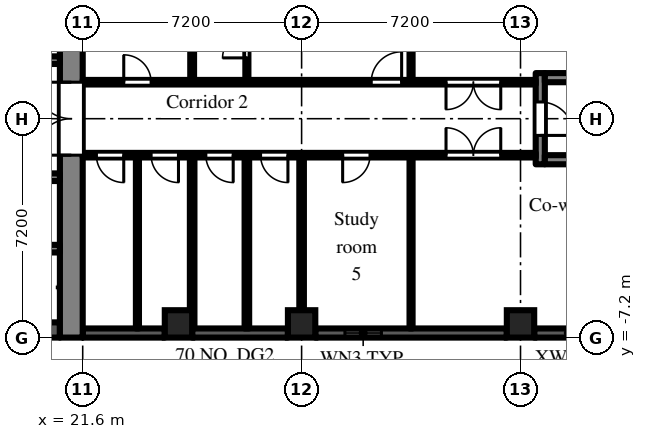
"""IFC4 building model, lengths in metres.
Left out: names, types, materials, properties, quantities, classifications, styles, units other than length and angle.
Written with IfcOpenShell. Run it as: python <this file> out.ifc"""

import sys

from ifc_helpers import new_model, si_unit, direction, frame, frame_2d, origin, origin_2d, place, context, subcontext, project, spatial, rectangle, extrude, element, fill, save


model = new_model("IFC4")
c1 = context("Model", 3, precision=1e-05, world=origin(), true_north=direction((0.0, 1.0)))
c2 = subcontext(c1, "Body", "Model", "MODEL_VIEW")
j1 = project(units=[si_unit("LENGTHUNIT", "METRE"), si_unit("PLANEANGLEUNIT", "RADIAN")], contexts=[c1])
p1 = place(None, origin())
s1 = spatial("IfcSite", under=j1, at=p1, CompositionType="ELEMENT")
p2 = place(p1, origin())
s2 = spatial("IfcBuilding", under=s1, at=p2, CompositionType="ELEMENT")
p3 = place(p2, frame((0.0, 0.0, 44.7)))
s3 = spatial("IfcBuildingStorey", under=s2, at=p3, CompositionType="ELEMENT", Elevation=44.7)
for number, where, z_axis, x_axis in (
    (1, (24.75, -6.75, 0.0), (0.0, 0.0, 1.0), (1.0, 0.0, 0.0)),
    (2, (28.8, -6.75, 0.0), (0.0, 0.0, 1.0), (1.0, 0.0, 0.0)),
    (3, (36.0, -6.75, 0.0), (0.0, 0.0, 1.0), (1.0, 0.0, 0.0)),
):
    element("IfcColumn", number, at=place(p3, frame(where, z_axis=z_axis, x_axis=x_axis)), inside=s3, PredefinedType="COLUMN", context=c2, shape_type="SweptSolid", body=[
        extrude(rectangle(XDim=0.9, YDim=0.9, at=origin_2d()), origin(), (0.0, 0.0, 1.0), 3.0),
    ])
p4 = place(p3, frame((21.6, -7.05, 0.0), z_axis=(0.0, 0.0, 1.0), x_axis=(1.0, 0.0, 0.0)))
e4 = element("IfcWall", 4, at=p4, inside=s3, PredefinedType="SOLIDWALL", context=c2, shape_type="SweptSolid", body=[
    extrude(rectangle(XDim=2.7, YDim=0.3, at=frame_2d((1.35, 0.0))), origin(), (0.0, 0.0, 1.0), 2.1),
])
p5 = place(p3, frame((25.2, -7.05, 0.0), z_axis=(0.0, 0.0, 1.0), x_axis=(1.0, 0.0, 0.0)))
e5 = element("IfcWall", 5, at=p5, inside=s3, PredefinedType="SOLIDWALL", context=c2, shape_type="SweptSolid", body=[
    extrude(rectangle(XDim=3.15, YDim=0.3, at=frame_2d((1.575, 0.0))), origin(), (0.0, 0.0, 1.0), 2.1),
])
p6 = place(p3, frame((29.25, -7.05, 0.0), z_axis=(0.0, 0.0, 1.0), x_axis=(1.0, 0.0, 0.0)))
e6 = element("IfcWall", 6, at=p6, inside=s3, PredefinedType="SOLIDWALL", context=c2, shape_type="SweptSolid", body=[
    extrude(rectangle(XDim=6.3, YDim=0.3, at=frame_2d((3.15, 0.0))), origin(), (0.0, 0.0, 1.0), 2.1),
])
p7 = place(p6, frame((0.975, 0.0, 0.2)))
e7 = element("IfcOpeningElement", 7, at=p7, cuts=e6, PredefinedType="OPENING", context=c2, shape_type="SweptSolid", body=[
    extrude(rectangle(XDim=1.2, YDim=1.85, at=frame_2d((0.6, 0.925))), frame((0.0, 0.16, 0.0), z_axis=(0.0, -1.0, 0.0), x_axis=(1.0, 0.0, 0.0)), (0.0, 0.0, 1.0), 0.32),
])
p8 = place(p3, frame((36.45, -7.05, 0.0), z_axis=(0.0, 0.0, 1.0), x_axis=(1.0, 0.0, 0.0)))
e8 = element("IfcWall", 8, at=p8, inside=s3, PredefinedType="SOLIDWALL", context=c2, shape_type="SweptSolid", body=[
    extrude(rectangle(XDim=2.25, YDim=0.3, at=frame_2d((1.125, 0.0))), origin(), (0.0, 0.0, 1.0), 2.1),
])
p9 = place(p3, frame((21.225, -7.2, 0.0), z_axis=(0.0, 0.0, 1.0), x_axis=(0.0, 1.0, 0.0)))
e9 = element("IfcWall", 9, at=p9, inside=s3, PredefinedType="SHEAR", context=c2, shape_type="SweptSolid", body=[
    extrude(rectangle(XDim=14.4, YDim=0.75, at=frame_2d((7.2, 0.0))), origin(), (0.0, 0.0, 1.0), 2.575),
])
p10 = place(p9, frame((6.0, 0.0, 0.0)))
e10 = element("IfcOpeningElement", 10, at=p10, cuts=e9, PredefinedType="OPENING", context=c2, shape_type="SweptSolid", body=[
    extrude(rectangle(XDim=2.4, YDim=2.2, at=frame_2d((1.2, 1.1))), frame((0.0, 0.385, 0.0), z_axis=(0.0, -1.0, 0.0), x_axis=(1.0, 0.0, 0.0)), (0.0, 0.0, 1.0), 0.77),
])
p11 = place(p3, frame((7.9, 1.925, 0.0), z_axis=(0.0, 0.0, 1.0), x_axis=(1.0, 0.0, 0.0)))
e11 = element("IfcWall", 11, at=p11, inside=s3, PredefinedType="SHEAR", context=c2, shape_type="SweptSolid", body=[
    extrude(rectangle(XDim=12.95, YDim=0.25, at=frame_2d((6.475, 0.0))), origin(), (0.0, 0.0, 1.0), 2.575),
])
p12 = place(p11, frame((0.525, 0.0, 0.0)))
e12 = element("IfcOpeningElement", 12, at=p12, cuts=e11, PredefinedType="OPENING", context=c2, shape_type="SweptSolid", body=[
    extrude(rectangle(XDim=0.9, YDim=2.1, at=frame_2d((0.45, 1.05))), frame((0.0, 0.135, 0.0), z_axis=(0.0, -1.0, 0.0), x_axis=(1.0, 0.0, 0.0)), (0.0, 0.0, 1.0), 0.27),
])
p13 = place(p11, frame((2.625, 0.0, 0.0)))
e13 = element("IfcOpeningElement", 13, at=p13, cuts=e11, PredefinedType="OPENING", context=c2, shape_type="SweptSolid", body=[
    extrude(rectangle(XDim=1.1, YDim=2.1, at=frame_2d((0.55, 1.05))), frame((0.0, 0.135, 0.0), z_axis=(0.0, -1.0, 0.0), x_axis=(1.0, 0.0, 0.0)), (0.0, 0.0, 1.0), 0.27),
])
p14 = place(p11, frame((4.925, 0.0, 0.0)))
e14 = element("IfcOpeningElement", 14, at=p14, cuts=e11, PredefinedType="OPENING", context=c2, shape_type="SweptSolid", body=[
    extrude(rectangle(XDim=0.9, YDim=2.1, at=frame_2d((0.45, 1.05))), frame((0.0, 0.135, 0.0), z_axis=(0.0, -1.0, 0.0), x_axis=(1.0, 0.0, 0.0)), (0.0, 0.0, 1.0), 0.27),
])
p15 = place(p11, frame((8.225, 0.0, 0.0)))
e15 = element("IfcOpeningElement", 15, at=p15, cuts=e11, PredefinedType="OPENING", context=c2, shape_type="SweptSolid", body=[
    extrude(rectangle(XDim=0.9, YDim=2.1, at=frame_2d((0.45, 1.05))), frame((0.0, 0.135, 0.0), z_axis=(0.0, -1.0, 0.0), x_axis=(1.0, 0.0, 0.0)), (0.0, 0.0, 1.0), 0.27),
])
p16 = place(p3, frame((7.9, -6.95, 0.0), z_axis=(0.0, 0.0, 1.0), x_axis=(1.0, 0.0, 0.0)))
e16 = element("IfcWall", 16, at=p16, inside=s3, PredefinedType="SHEAR", context=c2, shape_type="SweptSolid", body=[
    extrude(rectangle(XDim=12.95, YDim=0.5, at=frame_2d((6.475, 0.0))), origin(), (0.0, 0.0, 1.0), 2.575),
])
p17 = place(p3, frame((7.9, -1.925, 0.0), z_axis=(0.0, 0.0, 1.0), x_axis=(1.0, 0.0, 0.0)))
e17 = element("IfcWall", 17, at=p17, inside=s3, PredefinedType="SHEAR", context=c2, shape_type="SweptSolid", body=[
    extrude(rectangle(XDim=12.95, YDim=0.25, at=frame_2d((6.475, 0.0))), origin(), (0.0, 0.0, 1.0), 2.575),
])
p18 = place(p17, frame((4.825, 0.0, 0.0)))
e18 = element("IfcOpeningElement", 18, at=p18, cuts=e17, PredefinedType="OPENING", context=c2, shape_type="SweptSolid", body=[
    extrude(rectangle(XDim=1.1, YDim=2.1, at=frame_2d((0.55, 1.05))), frame((0.0, 0.135, 0.0), z_axis=(0.0, -1.0, 0.0), x_axis=(1.0, 0.0, 0.0)), (0.0, 0.0, 1.0), 0.27),
])
p19 = place(p17, frame((7.025, 0.0, 0.0)))
e19 = element("IfcOpeningElement", 19, at=p19, cuts=e17, PredefinedType="OPENING", context=c2, shape_type="SweptSolid", body=[
    extrude(rectangle(XDim=1.1, YDim=2.1, at=frame_2d((0.55, 1.05))), frame((0.0, 0.135, 0.0), z_axis=(0.0, -1.0, 0.0), x_axis=(1.0, 0.0, 0.0)), (0.0, 0.0, 1.0), 0.27),
])
p20 = place(p17, frame((9.225, 0.0, 0.0)))
e20 = element("IfcOpeningElement", 20, at=p20, cuts=e17, PredefinedType="OPENING", context=c2, shape_type="SweptSolid", body=[
    extrude(rectangle(XDim=1.1, YDim=2.1, at=frame_2d((0.55, 1.05))), frame((0.0, 0.135, 0.0), z_axis=(0.0, -1.0, 0.0), x_axis=(1.0, 0.0, 0.0)), (0.0, 0.0, 1.0), 0.27),
])
p21 = place(p17, frame((0.525, 0.0, 0.0)))
e21 = element("IfcOpeningElement", 21, at=p21, cuts=e17, PredefinedType="OPENING", context=c2, shape_type="SweptSolid", body=[
    extrude(rectangle(XDim=0.9, YDim=2.1, at=frame_2d((0.45, 1.05))), frame((0.0, 0.135, 0.0), z_axis=(0.0, -1.0, 0.0), x_axis=(1.0, 0.0, 0.0)), (0.0, 0.0, 1.0), 0.27),
])
p22 = place(p17, frame((2.625, 0.0, 0.0)))
e22 = element("IfcOpeningElement", 22, at=p22, cuts=e17, PredefinedType="OPENING", context=c2, shape_type="SweptSolid", body=[
    extrude(rectangle(XDim=1.1, YDim=2.1, at=frame_2d((0.55, 1.05))), frame((0.0, 0.135, 0.0), z_axis=(0.0, -1.0, 0.0), x_axis=(1.0, 0.0, 0.0)), (0.0, 0.0, 1.0), 0.27),
])
p23 = place(p3, frame((12.3, -4.275, 0.0), z_axis=(0.0, 0.0, 1.0), x_axis=(1.0, 0.0, 0.0)))
e23 = element("IfcWall", 23, at=p23, inside=s3, PredefinedType="SHEAR", context=c2, shape_type="SweptSolid", body=[
    extrude(rectangle(XDim=8.55, YDim=0.25, at=frame_2d((4.275, 0.0))), origin(), (0.0, 0.0, 1.0), 2.575),
])
p24 = place(p3, frame((36.65, -1.5, 0.0), z_axis=(0.0, 0.0, 1.0), x_axis=(0.0, 1.0, 0.0)))
e24 = element("IfcWall", 24, at=p24, inside=s3, PredefinedType="SHEAR", context=c2, shape_type="SweptSolid", body=[
    extrude(rectangle(XDim=3.0, YDim=0.3, at=frame_2d((1.5, 0.0))), origin(), (0.0, 0.0, 1.0), 2.575),
])
p25 = place(p24, frame((0.95, 0.0, 0.0)))
e25 = element("IfcOpeningElement", 25, at=p25, cuts=e24, PredefinedType="OPENING", context=c2, shape_type="SweptSolid", body=[
    extrude(rectangle(XDim=1.1, YDim=2.1, at=frame_2d((0.55, 1.05))), frame((0.0, 0.16, 0.0), z_axis=(0.0, -1.0, 0.0), x_axis=(1.0, 0.0, 0.0)), (0.0, 0.0, 1.0), 0.32),
])
for number, where, z_axis, x_axis in (
    (26, (36.8, -1.35, 0.0), (0.0, 0.0, 1.0), (1.0, 0.0, 0.0)),
    (27, (36.8, 1.35, 0.0), (0.0, 0.0, 1.0), (1.0, 0.0, 0.0)),
):
    element("IfcWall", number, at=place(p3, frame(where, z_axis=z_axis, x_axis=x_axis)), inside=s3, PredefinedType="SHEAR", context=c2, shape_type="SweptSolid", body=[
        extrude(rectangle(XDim=5.8, YDim=0.3, at=frame_2d((2.9, 0.0))), origin(), (0.0, 0.0, 1.0), 2.575),
    ])
p26 = place(p3, frame((21.6, -1.2, 0.0), z_axis=(0.0, 0.0, 1.0), x_axis=(1.0, 0.0, 0.0)))
e28 = element("IfcWall", 28, at=p26, inside=s3, PredefinedType="PARTITIONING", context=c2, shape_type="SweptSolid", body=[
    extrude(rectangle(XDim=14.9, YDim=0.15, at=frame_2d((7.45, 0.0))), origin(), (0.0, 0.0, 1.0), 2.575),
])
p27 = place(p26, frame((0.45, 0.0, 0.0)))
e29 = element("IfcOpeningElement", 29, at=p27, cuts=e28, PredefinedType="OPENING", context=c2, shape_type="SweptSolid", body=[
    extrude(rectangle(XDim=0.9, YDim=2.1, at=frame_2d((0.45, 1.05))), frame((0.0, 0.085, 0.0), z_axis=(0.0, -1.0, 0.0), x_axis=(1.0, 0.0, 0.0)), (0.0, 0.0, 1.0), 0.17),
])
p28 = place(p26, frame((2.25, 0.0, 0.0)))
e30 = element("IfcOpeningElement", 30, at=p28, cuts=e28, PredefinedType="OPENING", context=c2, shape_type="SweptSolid", body=[
    extrude(rectangle(XDim=0.9, YDim=2.1, at=frame_2d((0.45, 1.05))), frame((0.0, 0.085, 0.0), z_axis=(0.0, -1.0, 0.0), x_axis=(1.0, 0.0, 0.0)), (0.0, 0.0, 1.0), 0.17),
])
p29 = place(p26, frame((4.05, 0.0, 0.0)))
e31 = element("IfcOpeningElement", 31, at=p29, cuts=e28, PredefinedType="OPENING", context=c2, shape_type="SweptSolid", body=[
    extrude(rectangle(XDim=0.9, YDim=2.1, at=frame_2d((0.45, 1.05))), frame((0.0, 0.085, 0.0), z_axis=(0.0, -1.0, 0.0), x_axis=(1.0, 0.0, 0.0)), (0.0, 0.0, 1.0), 0.17),
])
p30 = place(p26, frame((5.85, 0.0, 0.0)))
e32 = element("IfcOpeningElement", 32, at=p30, cuts=e28, PredefinedType="OPENING", context=c2, shape_type="SweptSolid", body=[
    extrude(rectangle(XDim=0.9, YDim=2.1, at=frame_2d((0.45, 1.05))), frame((0.0, 0.085, 0.0), z_axis=(0.0, -1.0, 0.0), x_axis=(1.0, 0.0, 0.0)), (0.0, 0.0, 1.0), 0.17),
])
p31 = place(p26, frame((8.55, 0.0, 0.0)))
e33 = element("IfcOpeningElement", 33, at=p31, cuts=e28, PredefinedType="OPENING", context=c2, shape_type="SweptSolid", body=[
    extrude(rectangle(XDim=0.9, YDim=2.1, at=frame_2d((0.45, 1.05))), frame((0.0, 0.085, 0.0), z_axis=(0.0, -1.0, 0.0), x_axis=(1.0, 0.0, 0.0)), (0.0, 0.0, 1.0), 0.17),
])
p32 = place(p26, frame((11.95, 0.0, 0.0)))
e34 = element("IfcOpeningElement", 34, at=p32, cuts=e28, PredefinedType="OPENING", context=c2, shape_type="SweptSolid", body=[
    extrude(rectangle(XDim=1.8, YDim=2.1, at=frame_2d((0.9, 1.05))), frame((0.0, 0.085, 0.0), z_axis=(0.0, -1.0, 0.0), x_axis=(1.0, 0.0, 0.0)), (0.0, 0.0, 1.0), 0.17),
])
p33 = place(p3, frame((21.6, 1.2, 0.0), z_axis=(0.0, 0.0, 1.0), x_axis=(1.0, 0.0, 0.0)))
e35 = element("IfcWall", 35, at=p33, inside=s3, PredefinedType="PARTITIONING", context=c2, shape_type="SweptSolid", body=[
    extrude(rectangle(XDim=14.9, YDim=0.15, at=frame_2d((7.45, 0.0))), origin(), (0.0, 0.0, 1.0), 2.575),
])
p34 = place(p33, frame((1.35, 0.0, 0.0)))
e36 = element("IfcOpeningElement", 36, at=p34, cuts=e35, PredefinedType="OPENING", context=c2, shape_type="SweptSolid", body=[
    extrude(rectangle(XDim=0.9, YDim=2.1, at=frame_2d((0.45, 1.05))), frame((0.0, 0.085, 0.0), z_axis=(0.0, -1.0, 0.0), x_axis=(1.0, 0.0, 0.0)), (0.0, 0.0, 1.0), 0.17),
])
p35 = place(p33, frame((9.49, 0.0, 0.0)))
e37 = element("IfcOpeningElement", 37, at=p35, cuts=e35, PredefinedType="OPENING", context=c2, shape_type="SweptSolid", body=[
    extrude(rectangle(XDim=1.0, YDim=2.1, at=frame_2d((0.5, 1.05))), frame((0.0, 0.085, 0.0), z_axis=(0.0, -1.0, 0.0), x_axis=(1.0, 0.0, 0.0)), (0.0, 0.0, 1.0), 0.17),
])
p36 = place(p33, frame((11.95, 0.0, 0.0)))
e38 = element("IfcOpeningElement", 38, at=p36, cuts=e35, PredefinedType="OPENING", context=c2, shape_type="SweptSolid", body=[
    extrude(rectangle(XDim=1.8, YDim=2.1, at=frame_2d((0.9, 1.05))), frame((0.0, 0.085, 0.0), z_axis=(0.0, -1.0, 0.0), x_axis=(1.0, 0.0, 0.0)), (0.0, 0.0, 1.0), 0.17),
])
p37 = place(p3, frame((23.4, -6.9, 0.0), z_axis=(0.0, 0.0, 1.0), x_axis=(0.0, 1.0, 0.0)))
e39 = element("IfcWall", 39, at=p37, inside=s3, PredefinedType="PARTITIONING", context=c2, shape_type="SweptSolid", body=[
    extrude(rectangle(XDim=5.625, YDim=0.1, at=frame_2d((2.812, 0.0))), origin(), (0.0, 0.0, 1.0), 2.575),
])
p38 = place(p3, frame((25.2, -6.9, 0.0), z_axis=(0.0, 0.0, 1.0), x_axis=(0.0, 1.0, 0.0)))
e40 = element("IfcWall", 40, at=p38, inside=s3, PredefinedType="PARTITIONING", context=c2, shape_type="SweptSolid", body=[
    extrude(rectangle(XDim=5.625, YDim=0.15, at=frame_2d((2.812, 0.0))), origin(), (0.0, 0.0, 1.0), 2.575),
])
p39 = place(p3, frame((25.2, 1.275, 0.0), z_axis=(0.0, 0.0, 1.0), x_axis=(0.0, 1.0, 0.0)))
e41 = element("IfcWall", 41, at=p39, inside=s3, PredefinedType="PARTITIONING", context=c2, shape_type="SweptSolid", body=[
    extrude(rectangle(XDim=2.325, YDim=0.125, at=frame_2d((1.163, 0.0))), origin(), (0.0, 0.0, 1.0), 2.575),
])
p40 = place(p3, frame((27.0, -6.9, 0.0), z_axis=(0.0, 0.0, 1.0), x_axis=(0.0, 1.0, 0.0)))
e42 = element("IfcWall", 42, at=p40, inside=s3, PredefinedType="PARTITIONING", context=c2, shape_type="SweptSolid", body=[
    extrude(rectangle(XDim=5.625, YDim=0.15, at=frame_2d((2.812, 0.0))), origin(), (0.0, 0.0, 1.0), 2.575),
])
p41 = place(p3, frame((27.0, 1.275, 0.0), z_axis=(0.0, 0.0, 1.0), x_axis=(0.0, 1.0, 0.0)))
e43 = element("IfcWall", 43, at=p41, inside=s3, PredefinedType="PARTITIONING", context=c2, shape_type="SweptSolid", body=[
    extrude(rectangle(XDim=2.275, YDim=0.1, at=frame_2d((1.138, 0.0))), origin(), (0.0, 0.0, 1.0), 2.575),
])
p42 = place(p41, frame((0.725, 0.0, 0.0)))
e44 = element("IfcOpeningElement", 44, at=p42, cuts=e43, PredefinedType="OPENING", context=c2, shape_type="SweptSolid", body=[
    extrude(rectangle(XDim=0.8, YDim=2.1, at=frame_2d((0.4, 1.05))), frame((0.0, 0.06, 0.0), z_axis=(0.0, -1.0, 0.0), x_axis=(1.0, 0.0, 0.0)), (0.0, 0.0, 1.0), 0.12),
])
p43 = place(p3, frame((28.8, -6.9, 0.0), z_axis=(0.0, 0.0, 1.0), x_axis=(0.0, 1.0, 0.0)))
e45 = element("IfcWall", 45, at=p43, inside=s3, PredefinedType="PARTITIONING", context=c2, shape_type="SweptSolid", body=[
    extrude(rectangle(XDim=5.625, YDim=0.15, at=frame_2d((2.812, 0.0))), origin(), (0.0, 0.0, 1.0), 2.575),
])
for number, where, z_axis, x_axis in (
    (46, (32.4, -6.9, 0.0), (0.0, 0.0, 1.0), (0.0, 1.0, 0.0)),
    (47, (32.4, 1.275, 0.0), (0.0, 0.0, 1.0), (0.0, 1.0, 0.0)),
):
    element("IfcWall", number, at=place(p3, frame(where, z_axis=z_axis, x_axis=x_axis)), inside=s3, PredefinedType="PARTITIONING", context=c2, shape_type="SweptSolid", body=[
        extrude(rectangle(XDim=5.625, YDim=0.1, at=frame_2d((2.812, 0.0))), origin(), (0.0, 0.0, 1.0), 2.575),
    ])
p44 = place(p7, origin())
e48 = element("IfcWindow", 48, at=p44, inside=s3, PartitioningType="SINGLE_PANEL", PredefinedType="WINDOW", context=c2, shape_type="SweptSolid", body=[
    extrude(rectangle(XDim=1.2, YDim=1.85, at=frame_2d((0.6, 0.925))), frame((0.0, 0.03, 0.0), z_axis=(0.0, -1.0, 0.0), x_axis=(1.0, 0.0, 0.0)), (0.0, 0.0, 1.0), 0.06),
])
fill(e7, e48)
p45 = place(p10, origin())
e49 = element("IfcDoor", 49, at=p45, inside=s3, OperationType="DOUBLE_DOOR_DOUBLE_SWING", PredefinedType="DOOR", context=c2, shape_type="SweptSolid", body=[
    extrude(rectangle(XDim=2.4, YDim=2.2, at=frame_2d((1.2, 1.1))), frame((0.0, 0.025, 0.0), z_axis=(0.0, -1.0, 0.0), x_axis=(1.0, 0.0, 0.0)), (0.0, 0.0, 1.0), 0.05),
])
fill(e10, e49)
p46 = place(p25, frame((1.1, 0.0, 0.0), z_axis=(0.0, 0.0, 1.0), x_axis=(-1.0, 0.0, 0.0)))
e50 = element("IfcDoor", 50, at=p46, inside=s3, OperationType="SINGLE_SWING_RIGHT", PredefinedType="DOOR", context=c2, shape_type="SweptSolid", body=[
    extrude(rectangle(XDim=1.1, YDim=2.1, at=frame_2d((0.55, 1.05))), frame((0.0, 0.025, 0.0), z_axis=(0.0, -1.0, 0.0), x_axis=(1.0, 0.0, 0.0)), (0.0, 0.0, 1.0), 0.05),
])
fill(e25, e50)
p47 = place(p34, origin())
e51 = element("IfcDoor", 51, at=p47, inside=s3, OperationType="SINGLE_SWING_LEFT", PredefinedType="DOOR", context=c2, shape_type="SweptSolid", body=[
    extrude(rectangle(XDim=0.9, YDim=2.1, at=frame_2d((0.45, 1.05))), frame((0.0, 0.025, 0.0), z_axis=(0.0, -1.0, 0.0), x_axis=(1.0, 0.0, 0.0)), (0.0, 0.0, 1.0), 0.05),
])
fill(e36, e51)
p48 = place(p42, origin())
e52 = element("IfcDoor", 52, at=p48, inside=s3, OperationType="SINGLE_SWING_LEFT", PredefinedType="DOOR", context=c2, shape_type="SweptSolid", body=[
    extrude(rectangle(XDim=0.8, YDim=2.1, at=frame_2d((0.4, 1.05))), frame((0.0, 0.025, 0.0), z_axis=(0.0, -1.0, 0.0), x_axis=(1.0, 0.0, 0.0)), (0.0, 0.0, 1.0), 0.05),
])
fill(e44, e52)
p49 = place(p35, origin())
e53 = element("IfcDoor", 53, at=p49, inside=s3, OperationType="SINGLE_SWING_RIGHT", PredefinedType="DOOR", context=c2, shape_type="SweptSolid", body=[
    extrude(rectangle(XDim=1.0, YDim=2.1, at=frame_2d((0.5, 1.05))), frame((0.0, 0.025, 0.0), z_axis=(0.0, -1.0, 0.0), x_axis=(1.0, 0.0, 0.0)), (0.0, 0.0, 1.0), 0.05),
])
fill(e37, e53)
p50 = place(p36, frame((1.8, 0.0, 0.0), z_axis=(0.0, 0.0, 1.0), x_axis=(-1.0, 0.0, 0.0)))
e54 = element("IfcDoor", 54, at=p50, inside=s3, OperationType="DOUBLE_DOOR_DOUBLE_SWING", PredefinedType="DOOR", context=c2, shape_type="SweptSolid", body=[
    extrude(rectangle(XDim=1.8, YDim=2.1, at=frame_2d((0.9, 1.05))), frame((0.0, 0.025, 0.0), z_axis=(0.0, -1.0, 0.0), x_axis=(1.0, 0.0, 0.0)), (0.0, 0.0, 1.0), 0.05),
])
fill(e38, e54)
p51 = place(p27, frame((0.9, 0.0, 0.0), z_axis=(0.0, 0.0, 1.0), x_axis=(-1.0, 0.0, 0.0)))
e55 = element("IfcDoor", 55, at=p51, inside=s3, OperationType="SINGLE_SWING_LEFT", PredefinedType="DOOR", context=c2, shape_type="SweptSolid", body=[
    extrude(rectangle(XDim=0.9, YDim=2.1, at=frame_2d((0.45, 1.05))), frame((0.0, 0.025, 0.0), z_axis=(0.0, -1.0, 0.0), x_axis=(1.0, 0.0, 0.0)), (0.0, 0.0, 1.0), 0.05),
])
fill(e29, e55)
p52 = place(p28, frame((0.9, 0.0, 0.0), z_axis=(0.0, 0.0, 1.0), x_axis=(-1.0, 0.0, 0.0)))
e56 = element("IfcDoor", 56, at=p52, inside=s3, OperationType="SINGLE_SWING_LEFT", PredefinedType="DOOR", context=c2, shape_type="SweptSolid", body=[
    extrude(rectangle(XDim=0.9, YDim=2.1, at=frame_2d((0.45, 1.05))), frame((0.0, 0.025, 0.0), z_axis=(0.0, -1.0, 0.0), x_axis=(1.0, 0.0, 0.0)), (0.0, 0.0, 1.0), 0.05),
])
fill(e30, e56)
p53 = place(p29, frame((0.9, 0.0, 0.0), z_axis=(0.0, 0.0, 1.0), x_axis=(-1.0, 0.0, 0.0)))
e57 = element("IfcDoor", 57, at=p53, inside=s3, OperationType="SINGLE_SWING_LEFT", PredefinedType="DOOR", context=c2, shape_type="SweptSolid", body=[
    extrude(rectangle(XDim=0.9, YDim=2.1, at=frame_2d((0.45, 1.05))), frame((0.0, 0.025, 0.0), z_axis=(0.0, -1.0, 0.0), x_axis=(1.0, 0.0, 0.0)), (0.0, 0.0, 1.0), 0.05),
])
fill(e31, e57)
p54 = place(p30, frame((0.9, 0.0, 0.0), z_axis=(0.0, 0.0, 1.0), x_axis=(-1.0, 0.0, 0.0)))
e58 = element("IfcDoor", 58, at=p54, inside=s3, OperationType="SINGLE_SWING_LEFT", PredefinedType="DOOR", context=c2, shape_type="SweptSolid", body=[
    extrude(rectangle(XDim=0.9, YDim=2.1, at=frame_2d((0.45, 1.05))), frame((0.0, 0.025, 0.0), z_axis=(0.0, -1.0, 0.0), x_axis=(1.0, 0.0, 0.0)), (0.0, 0.0, 1.0), 0.05),
])
fill(e32, e58)
p55 = place(p31, frame((0.9, 0.0, 0.0), z_axis=(0.0, 0.0, 1.0), x_axis=(-1.0, 0.0, 0.0)))
e59 = element("IfcDoor", 59, at=p55, inside=s3, OperationType="SINGLE_SWING_RIGHT", PredefinedType="DOOR", context=c2, shape_type="SweptSolid", body=[
    extrude(rectangle(XDim=0.9, YDim=2.1, at=frame_2d((0.45, 1.05))), frame((0.0, 0.025, 0.0), z_axis=(0.0, -1.0, 0.0), x_axis=(1.0, 0.0, 0.0)), (0.0, 0.0, 1.0), 0.05),
])
fill(e33, e59)
p56 = place(p32, origin())
e60 = element("IfcDoor", 60, at=p56, inside=s3, OperationType="DOUBLE_DOOR_DOUBLE_SWING", PredefinedType="DOOR", context=c2, shape_type="SweptSolid", body=[
    extrude(rectangle(XDim=1.8, YDim=2.1, at=frame_2d((0.9, 1.05))), frame((0.0, 0.025, 0.0), z_axis=(0.0, -1.0, 0.0), x_axis=(1.0, 0.0, 0.0)), (0.0, 0.0, 1.0), 0.05),
])
fill(e34, e60)
save(model, sys.argv[1])
